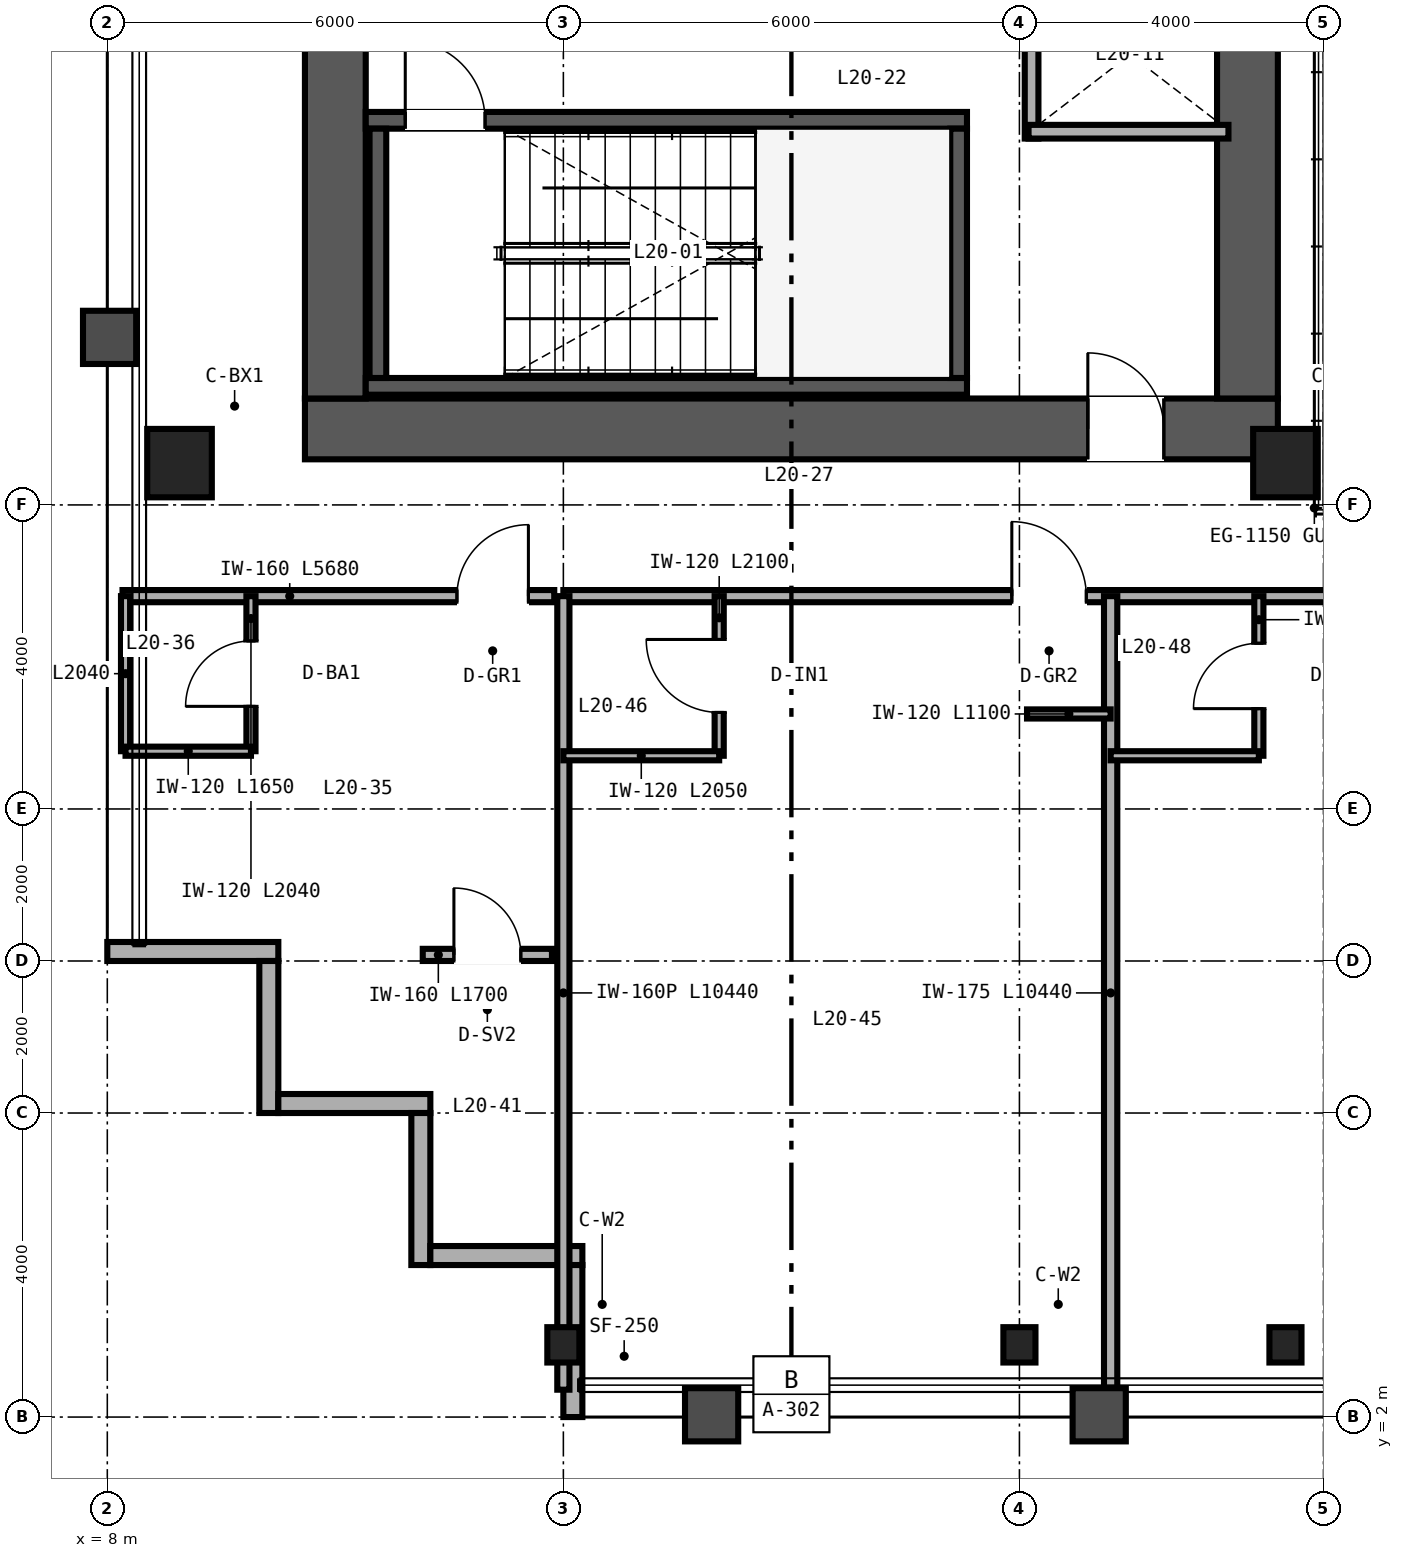
"""IFC4 building model, lengths in metres.
Left out: names, types, materials, properties, quantities, classifications, styles, units other than length and angle.
Written with IfcOpenShell. Run it as: python <this file> out.ifc"""

import sys

from ifc_helpers import new_model, si_unit, direction, frame, frame_2d, origin, origin_2d, place, context, subcontext, project, spatial, rectangle, hollow_rectangle, i_section, extrude, source, transform, mapped, element, fill, save


model = new_model("IFC4")
c1 = context("Model", 3, precision=1e-05, world=origin(), true_north=direction((0.0, 1.0)))
c2 = subcontext(c1, "Body", "Model", "MODEL_VIEW")
j1 = project(units=[si_unit("LENGTHUNIT", "METRE"), si_unit("PLANEANGLEUNIT", "RADIAN")], contexts=[c1])
p1 = place(None, origin())
s1 = spatial("IfcSite", under=j1, at=p1, CompositionType="ELEMENT")
p2 = place(p1, origin())
s2 = spatial("IfcBuilding", under=s1, at=p2, CompositionType="ELEMENT")
p3 = place(p2, frame((0.0, 0.0, 81.6)))
s3 = spatial("IfcBuildingStorey", under=s2, at=p3, CompositionType="ELEMENT", Elevation=81.6)
p4 = place(p3, frame((10.6, 15.0, 0.0), z_axis=(0.0, 0.0, 1.0), x_axis=(1.0, 0.0, 0.0)))
e1 = element("IfcWall", 1, at=p4, inside=s3, PredefinedType="SHEAR", context=c2, shape_type="SweptSolid", body=[
    extrude(rectangle(XDim=12.8, YDim=0.8, at=frame_2d((6.4, 0.0))), origin(), (0.0, 0.0, 1.0), 3.28),
])
p5 = place(p4, frame((10.3, 0.0, 0.0)))
e2 = element("IfcOpeningElement", 2, at=p5, cuts=e1, PredefinedType="OPENING", context=c2, shape_type="SweptSolid", body=[
    extrude(rectangle(XDim=1.0, YDim=2.15, at=frame_2d((0.5, 1.075))), frame((0.0, 0.41, 0.0), z_axis=(0.0, -1.0, 0.0), x_axis=(1.0, 0.0, 0.0)), (0.0, 0.0, 1.0), 0.82),
])
for number, where, z_axis, x_axis in (
    (3, (11.0, 15.4, 0.0), (0.0, 0.0, 1.0), (0.0, 1.0, 0.0)),
    (4, (23.0, 15.4, 0.0), (0.0, 0.0, 1.0), (0.0, 1.0, 0.0)),
):
    element("IfcWall", number, at=place(p3, frame(where, z_axis=z_axis, x_axis=x_axis)), inside=s3, PredefinedType="SHEAR", context=c2, shape_type="SweptSolid", body=[
        extrude(rectangle(XDim=21.2, YDim=0.8, at=frame_2d((10.6, 0.0))), origin(), (0.0, 0.0, 1.0), 3.28),
    ])
p6 = place(p3, frame((11.4, 15.56, 0.0), z_axis=(0.0, 0.0, 1.0), x_axis=(1.0, 0.0, 0.0)))
e5 = element("IfcWall", 5, at=p6, inside=s3, PredefinedType="SHEAR", context=c2, shape_type="SweptSolid", body=[
    extrude(rectangle(XDim=7.91, YDim=0.22, at=frame_2d((3.955, 0.0))), origin(), (0.0, 0.0, 1.0), 3.4),
])
p7 = place(p3, frame((11.4, 19.06, 0.0), z_axis=(0.0, 0.0, 1.0), x_axis=(1.0, 0.0, 0.0)))
e6 = element("IfcWall", 6, at=p7, inside=s3, PredefinedType="SHEAR", context=c2, shape_type="SweptSolid", body=[
    extrude(rectangle(XDim=7.91, YDim=0.22, at=frame_2d((3.955, 0.0))), origin(), (0.0, 0.0, 1.0), 3.4),
])
p8 = place(p7, frame((0.52, 0.0, 0.0)))
e7 = element("IfcOpeningElement", 7, at=p8, cuts=e6, PredefinedType="OPENING", context=c2, shape_type="SweptSolid", body=[
    extrude(rectangle(XDim=1.05, YDim=2.15, at=frame_2d((0.525, 1.075))), frame((0.0, 0.12, 0.0), z_axis=(0.0, -1.0, 0.0), x_axis=(1.0, 0.0, 0.0)), (0.0, 0.0, 1.0), 0.24),
])
for number, where, z_axis, x_axis in (
    (8, (11.56, 15.67, 0.0), (0.0, 0.0, 1.0), (0.0, 1.0, 0.0)),
    (9, (19.2, 15.67, 0.0), (0.0, 0.0, 1.0), (0.0, 1.0, 0.0)),
):
    element("IfcWall", number, at=place(p3, frame(where, z_axis=z_axis, x_axis=x_axis)), inside=s3, PredefinedType="SHEAR", context=c2, shape_type="SweptSolid", body=[
        extrude(rectangle(XDim=3.28, YDim=0.22, at=frame_2d((1.64, 0.0))), origin(), (0.0, 0.0, 1.0), 3.4),
    ])
m1 = source(origin(), c2, "Body", "SweptSolid", [
    extrude(hollow_rectangle(XDim=0.85, YDim=0.9, WallThickness=0.04, at=origin_2d()), origin(), (0.0, 0.0, 1.0), 3.28),
])
for number, where, z_axis, x_axis in (
    (10, (8.95, 14.55, 0.0), (0.0, 0.0, 1.0), (1.0, 0.0, 0.0)),
    (11, (23.5, 14.55, 0.0), (0.0, 0.0, 1.0), (1.0, 0.0, 0.0)),
):
    element("IfcColumn", number, at=place(p3, frame(where, z_axis=z_axis, x_axis=x_axis)), inside=s3, PredefinedType="COLUMN", context=c2, shape_type="MappedRepresentation", body=[
        mapped(m1, transform((0.0, 0.0, 0.0), scale=1.0)),
    ])
m2 = source(origin(), c2, "Body", "SweptSolid", [
    extrude(i_section(OverallWidth=0.422, OverallDepth=0.465, WebThickness=0.045, FlangeThickness=0.073, FilletRadius=0.025, at=origin_2d()), origin(), (0.0, 0.0, 1.0), 3.28),
])
for number, where, z_axis, x_axis in (
    (12, (14.0, 2.95, 0.0), (0.0, 0.0, 1.0), (1.0, 0.0, 0.0)),
    (13, (20.0, 2.95, 0.0), (0.0, 0.0, 1.0), (1.0, 0.0, 0.0)),
    (14, (23.5, 2.95, 0.0), (0.0, 0.0, 1.0), (1.0, 0.0, 0.0)),
):
    element("IfcColumn", number, at=place(p3, frame(where, z_axis=z_axis, x_axis=x_axis)), inside=s3, PredefinedType="COLUMN", context=c2, shape_type="MappedRepresentation", body=[
        mapped(m2, transform((0.0, 0.0, 0.0), scale=1.0)),
    ])
p9 = place(p3, frame((8.0, 8.125, 0.0), z_axis=(0.0, 0.0, 1.0), x_axis=(1.0, 0.0, 0.0)))
e15 = element("IfcWall", 15, at=p9, inside=s3, PredefinedType="SOLIDWALL", context=c2, shape_type="SweptSolid", body=[
    extrude(rectangle(XDim=2.25, YDim=0.25, at=frame_2d((1.125, 0.0))), origin(), (0.0, 0.0, 1.0), 3.28),
])
for number, where, z_axis, x_axis in (
    (16, (10.125, 8.0, 0.0), (0.0, 0.0, 1.0), (0.0, -1.0, 0.0)),
    (17, (10.25, 6.125, 0.0), (0.0, 0.0, 1.0), (1.0, 0.0, 0.0)),
    (18, (12.125, 6.0, 0.0), (0.0, 0.0, 1.0), (0.0, -1.0, 0.0)),
    (19, (12.25, 4.125, 0.0), (0.0, 0.0, 1.0), (1.0, 0.0, 0.0)),
):
    element("IfcWall", number, at=place(p3, frame(where, z_axis=z_axis, x_axis=x_axis)), inside=s3, PredefinedType="SOLIDWALL", context=c2, shape_type="SweptSolid", body=[
        extrude(rectangle(XDim=2.0, YDim=0.25, at=frame_2d((1.0, 0.0))), origin(), (0.0, 0.0, 1.0), 3.28),
    ])
p10 = place(p3, frame((14.125, 4.0, 0.0), z_axis=(0.0, 0.0, 1.0), x_axis=(0.0, -1.0, 0.0)))
e20 = element("IfcWall", 20, at=p10, inside=s3, PredefinedType="SOLIDWALL", context=c2, shape_type="SweptSolid", body=[
    extrude(rectangle(XDim=2.0, YDim=0.25, at=frame_2d((1.0, 0.0))), origin(), (0.0, 0.0, 1.0), 2.587),
])
p11 = place(p3, frame((20.16, 18.82, 0.0), z_axis=(0.0, 0.0, 1.0), x_axis=(0.0, 1.0, 0.0)))
e21 = element("IfcWall", 21, at=p11, inside=s3, PredefinedType="SOLIDWALL", context=c2, shape_type="SweptSolid", body=[
    extrude(rectangle(XDim=6.32, YDim=0.18, at=frame_2d((3.16, 0.0))), origin(), (0.0, 0.0, 1.0), 2.36),
])
p12 = place(p3, frame((20.12, 18.91, 0.0), z_axis=(0.0, 0.0, 1.0), x_axis=(1.0, 0.0, 0.0)))
e22 = element("IfcWall", 22, at=p12, inside=s3, PredefinedType="SOLIDWALL", context=c2, shape_type="SweptSolid", body=[
    extrude(rectangle(XDim=2.63, YDim=0.18, at=frame_2d((1.315, 0.0))), origin(), (0.0, 0.0, 1.0), 3.28),
])
p13 = place(p3, frame((8.2, 12.8, 0.0), z_axis=(0.0, 0.0, 1.0), x_axis=(1.0, 0.0, 0.0)))
e23 = element("IfcWall", 23, at=p13, inside=s3, PredefinedType="PARTITIONING", context=c2, shape_type="SweptSolid", body=[
    extrude(rectangle(XDim=5.68, YDim=0.16, at=frame_2d((2.84, 0.0))), origin(), (0.0, 0.0, 1.0), 3.28),
])
p14 = place(p13, frame((4.4, 0.0, 0.0)))
e24 = element("IfcOpeningElement", 24, at=p14, cuts=e23, PredefinedType="OPENING", context=c2, shape_type="SweptSolid", body=[
    extrude(rectangle(XDim=0.94, YDim=2.15, at=frame_2d((0.47, 1.075))), frame((0.0, 0.09, 0.0), z_axis=(0.0, -1.0, 0.0), x_axis=(1.0, 0.0, 0.0)), (0.0, 0.0, 1.0), 0.18),
])
p15 = place(p3, frame((9.89, 10.76, 0.0), z_axis=(0.0, 0.0, 1.0), x_axis=(0.0, 1.0, 0.0)))
e25 = element("IfcWall", 25, at=p15, inside=s3, PredefinedType="PARTITIONING", context=c2, shape_type="SweptSolid", body=[
    extrude(rectangle(XDim=2.04, YDim=0.12, at=frame_2d((1.02, 0.0))), origin(), (0.0, 0.0, 1.0), 3.28),
])
p16 = place(p15, frame((0.59, 0.0, 0.0)))
e26 = element("IfcOpeningElement", 26, at=p16, cuts=e25, PredefinedType="OPENING", context=c2, shape_type="SweptSolid", body=[
    extrude(rectangle(XDim=0.86, YDim=2.1, at=frame_2d((0.43, 1.05))), frame((0.0, 0.07, 0.0), z_axis=(0.0, -1.0, 0.0), x_axis=(1.0, 0.0, 0.0)), (0.0, 0.0, 1.0), 0.14),
])
p17 = place(p3, frame((8.24, 10.76, 0.0), z_axis=(0.0, 0.0, 1.0), x_axis=(0.0, 1.0, 0.0)))
e27 = element("IfcWall", 27, at=p17, inside=s3, PredefinedType="PARTITIONING", context=c2, shape_type="SweptSolid", body=[
    extrude(rectangle(XDim=2.04, YDim=0.12, at=frame_2d((1.02, 0.0))), origin(), (0.0, 0.0, 1.0), 3.28),
])
p18 = place(p3, frame((8.24, 10.76, 0.0), z_axis=(0.0, 0.0, 1.0), x_axis=(1.0, 0.0, 0.0)))
e28 = element("IfcWall", 28, at=p18, inside=s3, PredefinedType="PARTITIONING", context=c2, shape_type="SweptSolid", body=[
    extrude(rectangle(XDim=1.65, YDim=0.12, at=frame_2d((0.825, 0.0))), origin(), (0.0, 0.0, 1.0), 3.28),
])
p19 = place(p3, frame((12.15, 8.08, 0.0), z_axis=(0.0, 0.0, 1.0), x_axis=(1.0, 0.0, 0.0)))
e29 = element("IfcWall", 29, at=p19, inside=s3, PredefinedType="PARTITIONING", context=c2, shape_type="SweptSolid", body=[
    extrude(rectangle(XDim=1.7, YDim=0.16, at=frame_2d((0.85, 0.0))), origin(), (0.0, 0.0, 1.0), 3.28),
])
p20 = place(p19, frame((0.41, 0.0, 0.0)))
e30 = element("IfcOpeningElement", 30, at=p20, cuts=e29, PredefinedType="OPENING", context=c2, shape_type="SweptSolid", body=[
    extrude(rectangle(XDim=0.88, YDim=2.15, at=frame_2d((0.44, 1.075))), frame((0.0, 0.09, 0.0), z_axis=(0.0, -1.0, 0.0), x_axis=(1.0, 0.0, 0.0)), (0.0, 0.0, 1.0), 0.18),
])
p21 = place(p3, frame((14.0, 12.8, 0.0), z_axis=(0.0, 0.0, 1.0), x_axis=(1.0, 0.0, 0.0)))
e31 = element("IfcWall", 31, at=p21, inside=s3, PredefinedType="PARTITIONING", context=c2, shape_type="SweptSolid", body=[
    extrude(rectangle(XDim=36.0, YDim=0.16, at=frame_2d((18.0, 0.0))), origin(), (0.0, 0.0, 1.0), 2.501),
])
p22 = place(p21, frame((5.9, 0.0, 0.0)))
e32 = element("IfcOpeningElement", 32, at=p22, cuts=e31, PredefinedType="OPENING", context=c2, shape_type="SweptSolid", body=[
    extrude(rectangle(XDim=0.98, YDim=2.2, at=frame_2d((0.49, 1.1))), frame((0.0, 0.09, 0.0), z_axis=(0.0, -1.0, 0.0), x_axis=(1.0, 0.0, 0.0)), (0.0, 0.0, 1.0), 0.18),
])
p23 = place(p21, frame((13.1, 0.0, 0.0)))
e33 = element("IfcOpeningElement", 33, at=p23, cuts=e31, PredefinedType="OPENING", context=c2, shape_type="SweptSolid", body=[
    extrude(rectangle(XDim=0.98, YDim=2.2, at=frame_2d((0.49, 1.1))), frame((0.0, 0.09, 0.0), z_axis=(0.0, -1.0, 0.0), x_axis=(1.0, 0.0, 0.0)), (0.0, 0.0, 1.0), 0.18),
])
p24 = place(p21, frame((20.34, 0.0, 0.0)))
e34 = element("IfcOpeningElement", 34, at=p24, cuts=e31, PredefinedType="OPENING", context=c2, shape_type="SweptSolid", body=[
    extrude(rectangle(XDim=0.94, YDim=2.15, at=frame_2d((0.47, 1.075))), frame((0.0, 0.09, 0.0), z_axis=(0.0, -1.0, 0.0), x_axis=(1.0, 0.0, 0.0)), (0.0, 0.0, 1.0), 0.18),
])
p25 = place(p21, frame((27.34, 0.0, 0.0)))
e35 = element("IfcOpeningElement", 35, at=p25, cuts=e31, PredefinedType="OPENING", context=c2, shape_type="SweptSolid", body=[
    extrude(rectangle(XDim=0.94, YDim=2.15, at=frame_2d((0.47, 1.075))), frame((0.0, 0.09, 0.0), z_axis=(0.0, -1.0, 0.0), x_axis=(1.0, 0.0, 0.0)), (0.0, 0.0, 1.0), 0.18),
])
p26 = place(p21, frame((31.82, 0.0, 0.0)))
e36 = element("IfcOpeningElement", 36, at=p26, cuts=e31, PredefinedType="OPENING", context=c2, shape_type="SweptSolid", body=[
    extrude(rectangle(XDim=0.96, YDim=2.15, at=frame_2d((0.48, 1.075))), frame((0.0, 0.09, 0.0), z_axis=(0.0, -1.0, 0.0), x_axis=(1.0, 0.0, 0.0)), (0.0, 0.0, 1.0), 0.18),
])
p27 = place(p3, frame((14.0, 2.36, 0.0), z_axis=(0.0, 0.0, 1.0), x_axis=(0.0, 1.0, 0.0)))
e37 = element("IfcWall", 37, at=p27, inside=s3, PredefinedType="PARTITIONING", context=c2, shape_type="SweptSolid", body=[
    extrude(rectangle(XDim=10.44, YDim=0.16, at=frame_2d((5.22, 0.0))), origin(), (0.0, 0.0, 1.0), 2.587),
])
p28 = place(p3, frame((21.2, 2.36, 0.0), z_axis=(0.0, 0.0, 1.0), x_axis=(0.0, 1.0, 0.0)))
e38 = element("IfcWall", 38, at=p28, inside=s3, PredefinedType="PARTITIONING", context=c2, shape_type="SweptSolid", body=[
    extrude(rectangle(XDim=10.44, YDim=0.175, at=frame_2d((5.22, 0.0))), origin(), (0.0, 0.0, 1.0), 2.743),
])
p29 = place(p3, frame((16.05, 10.7, 0.0), z_axis=(0.0, 0.0, 1.0), x_axis=(0.0, 1.0, 0.0)))
e39 = element("IfcWall", 39, at=p29, inside=s3, PredefinedType="PARTITIONING", context=c2, shape_type="SweptSolid", body=[
    extrude(rectangle(XDim=2.1, YDim=0.12, at=frame_2d((1.05, 0.0))), origin(), (0.0, 0.0, 1.0), 3.28),
])
p30 = place(p29, frame((0.57, 0.0, 0.0)))
e40 = element("IfcOpeningElement", 40, at=p30, cuts=e39, PredefinedType="OPENING", context=c2, shape_type="SweptSolid", body=[
    extrude(rectangle(XDim=0.96, YDim=2.15, at=frame_2d((0.48, 1.075))), frame((0.0, 0.07, 0.0), z_axis=(0.0, -1.0, 0.0), x_axis=(1.0, 0.0, 0.0)), (0.0, 0.0, 1.0), 0.14),
])
p31 = place(p3, frame((14.0, 10.7, 0.0), z_axis=(0.0, 0.0, 1.0), x_axis=(1.0, 0.0, 0.0)))
e41 = element("IfcWall", 41, at=p31, inside=s3, PredefinedType="PARTITIONING", context=c2, shape_type="SweptSolid", body=[
    extrude(rectangle(XDim=2.05, YDim=0.12, at=frame_2d((1.025, 0.0))), origin(), (0.0, 0.0, 1.0), 3.28),
])
p32 = place(p3, frame((20.1, 11.25, 0.0), z_axis=(0.0, 0.0, 1.0), x_axis=(1.0, 0.0, 0.0)))
e42 = element("IfcWall", 42, at=p32, inside=s3, PredefinedType="PARTITIONING", context=c2, shape_type="SweptSolid", body=[
    extrude(rectangle(XDim=1.1, YDim=0.12, at=frame_2d((0.55, 0.0))), origin(), (0.0, 0.0, 1.0), 3.28),
])
p33 = place(p3, frame((23.15, 10.7, 0.0), z_axis=(0.0, 0.0, 1.0), x_axis=(0.0, 1.0, 0.0)))
e43 = element("IfcWall", 43, at=p33, inside=s3, PredefinedType="PARTITIONING", context=c2, shape_type="SweptSolid", body=[
    extrude(rectangle(XDim=2.1, YDim=0.12, at=frame_2d((1.05, 0.0))), origin(), (0.0, 0.0, 1.0), 3.28),
])
p34 = place(p33, frame((0.62, 0.0, 0.0)))
e44 = element("IfcOpeningElement", 44, at=p34, cuts=e43, PredefinedType="OPENING", context=c2, shape_type="SweptSolid", body=[
    extrude(rectangle(XDim=0.86, YDim=2.1, at=frame_2d((0.43, 1.05))), frame((0.0, 0.07, 0.0), z_axis=(0.0, -1.0, 0.0), x_axis=(1.0, 0.0, 0.0)), (0.0, 0.0, 1.0), 0.14),
])
p35 = place(p3, frame((21.2, 10.7, 0.0), z_axis=(0.0, 0.0, 1.0), x_axis=(1.0, 0.0, 0.0)))
e45 = element("IfcWall", 45, at=p35, inside=s3, PredefinedType="PARTITIONING", context=c2, shape_type="SweptSolid", body=[
    extrude(rectangle(XDim=1.95, YDim=0.12, at=frame_2d((0.975, 0.0))), origin(), (0.0, 0.0, 1.0), 3.28),
])
m3 = source(origin(), c2, "Body", "SweptSolid", [
    extrude(rectangle(XDim=1.05, YDim=2.15, at=frame_2d((0.525, 1.075))), frame((0.0, 0.025, 0.0), z_axis=(0.0, -1.0, 0.0), x_axis=(1.0, 0.0, 0.0)), (0.0, 0.0, 1.0), 0.05),
])
p36 = place(p8, origin())
e46 = element("IfcDoor", 46, at=p36, inside=s3, OperationType="SINGLE_SWING_LEFT", PredefinedType="DOOR", context=c2, shape_type="MappedRepresentation", body=[
    mapped(m3, transform((0.0, 0.0, 0.0), scale=1.0)),
])
fill(e7, e46)
m4 = source(origin(), c2, "Body", "SweptSolid", [
    extrude(rectangle(XDim=1.0, YDim=2.15, at=frame_2d((0.5, 1.075))), frame((0.0, 0.025, 0.0), z_axis=(0.0, -1.0, 0.0), x_axis=(1.0, 0.0, 0.0)), (0.0, 0.0, 1.0), 0.05),
])
p37 = place(p5, origin())
e47 = element("IfcDoor", 47, at=p37, inside=s3, OperationType="SINGLE_SWING_LEFT", PredefinedType="DOOR", context=c2, shape_type="MappedRepresentation", body=[
    mapped(m4, transform((0.0, 0.0, 0.0), scale=1.0)),
])
fill(e2, e47)
m5 = source(origin(), c2, "Body", "SweptSolid", [
    extrude(rectangle(XDim=0.86, YDim=2.1, at=frame_2d((0.43, 1.05))), frame((0.0, 0.025, 0.0), z_axis=(0.0, -1.0, 0.0), x_axis=(1.0, 0.0, 0.0)), (0.0, 0.0, 1.0), 0.05),
])
p38 = place(p16, origin())
e48 = element("IfcDoor", 48, at=p38, inside=s3, OperationType="SINGLE_SWING_LEFT", PredefinedType="DOOR", context=c2, shape_type="MappedRepresentation", body=[
    mapped(m5, transform((0.0, 0.0, 0.0), scale=1.0)),
])
fill(e26, e48)
m6 = source(origin(), c2, "Body", "SweptSolid", [
    extrude(rectangle(XDim=0.94, YDim=2.15, at=frame_2d((0.47, 1.075))), frame((0.0, 0.025, 0.0), z_axis=(0.0, -1.0, 0.0), x_axis=(1.0, 0.0, 0.0)), (0.0, 0.0, 1.0), 0.05),
])
p39 = place(p14, origin())
e49 = element("IfcDoor", 49, at=p39, inside=s3, OperationType="SINGLE_SWING_RIGHT", PredefinedType="DOOR", context=c2, shape_type="MappedRepresentation", body=[
    mapped(m6, transform((0.0, 0.0, 0.0), scale=1.0)),
])
fill(e24, e49)
m7 = source(origin(), c2, "Body", "SweptSolid", [
    extrude(rectangle(XDim=0.88, YDim=2.15, at=frame_2d((0.44, 1.075))), frame((0.0, 0.025, 0.0), z_axis=(0.0, -1.0, 0.0), x_axis=(1.0, 0.0, 0.0)), (0.0, 0.0, 1.0), 0.05),
])
p40 = place(p20, origin())
e50 = element("IfcDoor", 50, at=p40, inside=s3, OperationType="SINGLE_SWING_LEFT", PredefinedType="DOOR", context=c2, shape_type="MappedRepresentation", body=[
    mapped(m7, transform((0.0, 0.0, 0.0), scale=1.0)),
])
fill(e30, e50)
m8 = source(origin(), c2, "Body", "SweptSolid", [
    extrude(rectangle(XDim=0.96, YDim=2.15, at=frame_2d((0.48, 1.075))), frame((0.0, 0.025, 0.0), z_axis=(0.0, -1.0, 0.0), x_axis=(1.0, 0.0, 0.0)), (0.0, 0.0, 1.0), 0.05),
])
p41 = place(p30, origin())
e51 = element("IfcDoor", 51, at=p41, inside=s3, OperationType="SINGLE_SWING_RIGHT", PredefinedType="DOOR", context=c2, shape_type="MappedRepresentation", body=[
    mapped(m8, transform((0.0, 0.0, 0.0), scale=1.0)),
])
fill(e40, e51)
p42 = place(p34, origin())
e52 = element("IfcDoor", 52, at=p42, inside=s3, OperationType="SINGLE_SWING_LEFT", PredefinedType="DOOR", context=c2, shape_type="MappedRepresentation", body=[
    mapped(m5, transform((0.0, 0.0, 0.0), scale=1.0)),
])
fill(e44, e52)
m9 = source(origin(), c2, "Body", "SweptSolid", [
    extrude(rectangle(XDim=0.98, YDim=2.2, at=frame_2d((0.49, 1.1))), frame((0.0, 0.025, 0.0), z_axis=(0.0, -1.0, 0.0), x_axis=(1.0, 0.0, 0.0)), (0.0, 0.0, 1.0), 0.05),
])
p43 = place(p22, origin())
e53 = element("IfcDoor", 53, at=p43, inside=s3, OperationType="SINGLE_SWING_LEFT", PredefinedType="DOOR", context=c2, shape_type="MappedRepresentation", body=[
    mapped(m9, transform((0.0, 0.0, 0.0), scale=1.0)),
])
fill(e32, e53)
save(model, sys.argv[1])
